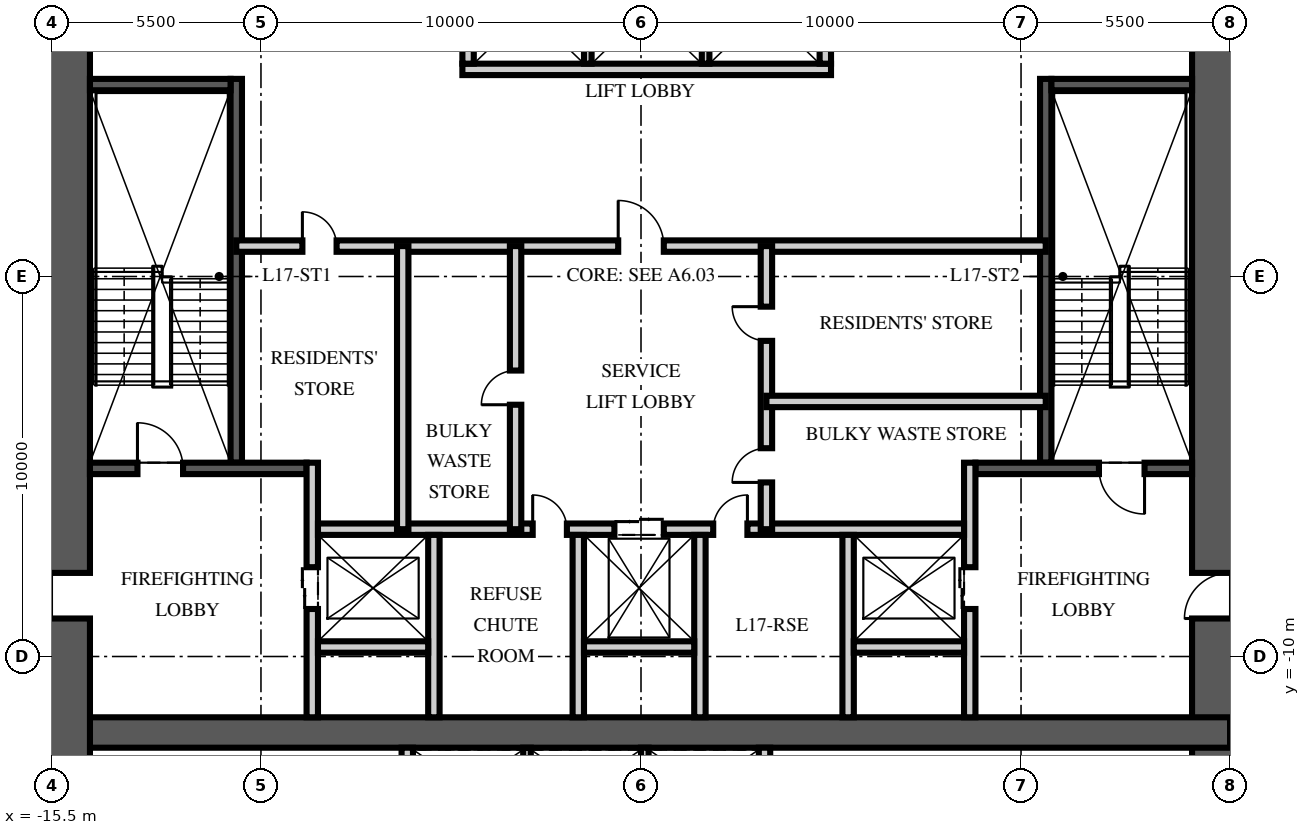
"""IFC4 building model, lengths in metres.
Left out: names, types, materials, properties, quantities, classifications, styles, units other than length and angle.
Written with IfcOpenShell. Run it as: python <this file> out.ifc"""

import sys

from ifc_helpers import new_model, si_unit, direction, frame, frame_2d, origin, place, context, subcontext, project, spatial, rectangle, extrude, element, fill, save


model = new_model("IFC4")
c1 = context("Model", 3, precision=1e-05, world=origin(), true_north=direction((0.0, 1.0)))
c2 = subcontext(c1, "Body", "Model", "MODEL_VIEW")
j1 = project(units=[si_unit("LENGTHUNIT", "METRE"), si_unit("PLANEANGLEUNIT", "RADIAN")], contexts=[c1])
p1 = place(None, origin())
s1 = spatial("IfcSite", under=j1, at=p1, CompositionType="ELEMENT")
p2 = place(p1, origin())
s2 = spatial("IfcBuilding", under=s1, at=p2, CompositionType="ELEMENT")
p3 = place(p2, frame((0.0, 0.0, 69.75)))
s3 = spatial("IfcBuildingStorey", under=s2, at=p3, CompositionType="ELEMENT", Elevation=69.75)
p4 = place(p3, frame((15.5, -15.5, -0.25), z_axis=(0.0, 0.0, 1.0), x_axis=(0.0, 1.0, 0.0)))
e1 = element("IfcWall", 1, at=p4, inside=s3, PredefinedType="SHEAR", context=c2, shape_type="SweptSolid", body=[
    extrude(rectangle(XDim=31.0, YDim=2.0, at=frame_2d((15.5, 0.0))), origin(), (0.0, 0.0, 1.0), 3.75),
])
p5 = place(p4, frame((6.5, 0.0, 0.25)))
e2 = element("IfcOpeningElement", 2, at=p5, cuts=e1, PredefinedType="OPENING", context=c2, shape_type="SweptSolid", body=[
    extrude(rectangle(XDim=1.2, YDim=2.1, at=frame_2d((0.6, 1.05))), frame((0.0, 1.01, 0.0), z_axis=(0.0, -1.0, 0.0), x_axis=(1.0, 0.0, 0.0)), (0.0, 0.0, 1.0), 2.02),
])
p6 = place(p4, frame((23.0, 0.0, 0.25)))
e3 = element("IfcOpeningElement", 3, at=p6, cuts=e1, PredefinedType="OPENING", context=c2, shape_type="SweptSolid", body=[
    extrude(rectangle(XDim=1.8, YDim=2.1, at=frame_2d((0.9, 1.05))), frame((0.0, 1.01, 0.0), z_axis=(0.0, -1.0, 0.0), x_axis=(1.0, 0.0, 0.0)), (0.0, 0.0, 1.0), 2.02),
])
p7 = place(p3, frame((-15.5, -12.0, -0.25), z_axis=(0.0, 0.0, 1.0), x_axis=(1.0, 0.0, 0.0)))
e4 = element("IfcWall", 4, at=p7, inside=s3, PredefinedType="SHEAR", context=c2, shape_type="SweptSolid", body=[
    extrude(rectangle(XDim=31.0, YDim=0.8, at=frame_2d((15.5, 0.0))), origin(), (0.0, 0.0, 1.0), 3.75),
])
p8 = place(p3, frame((-15.5, -15.5, -0.25), z_axis=(0.0, 0.0, 1.0), x_axis=(0.0, 1.0, 0.0)))
e5 = element("IfcWall", 5, at=p8, inside=s3, PredefinedType="SHEAR", context=c2, shape_type="SweptSolid", body=[
    extrude(rectangle(XDim=31.0, YDim=2.0, at=frame_2d((15.5, 0.0))), origin(), (0.0, 0.0, 1.0), 3.75),
])
p9 = place(p8, frame((6.5, 0.0, 0.25)))
e6 = element("IfcOpeningElement", 6, at=p9, cuts=e5, PredefinedType="OPENING", context=c2, shape_type="SweptSolid", body=[
    extrude(rectangle(XDim=1.2, YDim=2.1, at=frame_2d((0.6, 1.05))), frame((0.0, 1.01, 0.0), z_axis=(0.0, -1.0, 0.0), x_axis=(1.0, 0.0, 0.0)), (0.0, 0.0, 1.0), 2.02),
])
p10 = place(p8, frame((23.0, 0.0, 0.25)))
e7 = element("IfcOpeningElement", 7, at=p10, cuts=e5, PredefinedType="OPENING", context=c2, shape_type="SweptSolid", body=[
    extrude(rectangle(XDim=1.8, YDim=2.1, at=frame_2d((0.9, 1.05))), frame((0.0, 1.01, 0.0), z_axis=(0.0, -1.0, 0.0), x_axis=(1.0, 0.0, 0.0)), (0.0, 0.0, 1.0), 2.02),
])
p11 = place(p3, frame((-10.65, -4.9, 0.0), z_axis=(0.0, 0.0, 1.0), x_axis=(0.0, 1.0, 0.0)))
e8 = element("IfcWall", 8, at=p11, inside=s3, PredefinedType="SOLIDWALL", context=c2, shape_type="SweptSolid", body=[
    extrude(rectangle(XDim=10.1, YDim=0.3, at=frame_2d((5.05, 0.0))), origin(), (0.0, 0.0, 1.0), 3.5),
])
p12 = place(p3, frame((-14.5, -5.05, 0.0), z_axis=(0.0, 0.0, 1.0), x_axis=(1.0, 0.0, 0.0)))
e9 = element("IfcWall", 9, at=p12, inside=s3, PredefinedType="SOLIDWALL", context=c2, shape_type="SweptSolid", body=[
    extrude(rectangle(XDim=5.7, YDim=0.3, at=frame_2d((2.85, 0.0))), origin(), (0.0, 0.0, 1.0), 3.5),
])
p13 = place(p12, frame((1.25, 0.0, 0.0)))
e10 = element("IfcOpeningElement", 10, at=p13, cuts=e9, PredefinedType="OPENING", context=c2, shape_type="SweptSolid", body=[
    extrude(rectangle(XDim=1.2, YDim=2.1, at=frame_2d((0.6, 1.05))), frame((0.0, 0.16, 0.0), z_axis=(0.0, -1.0, 0.0), x_axis=(1.0, 0.0, 0.0)), (0.0, 0.0, 1.0), 0.32),
])
p14 = place(p3, frame((-14.5, 5.05, 0.0), z_axis=(0.0, 0.0, 1.0), x_axis=(1.0, 0.0, 0.0)))
e11 = element("IfcWall", 11, at=p14, inside=s3, PredefinedType="SOLIDWALL", context=c2, shape_type="SweptSolid", body=[
    extrude(rectangle(XDim=3.7, YDim=0.3, at=frame_2d((1.85, 0.0))), origin(), (0.0, 0.0, 1.0), 3.5),
])
p15 = place(p3, frame((-8.65, -11.6, 0.0), z_axis=(0.0, 0.0, 1.0), x_axis=(0.0, 1.0, 0.0)))
e12 = element("IfcWall", 12, at=p15, inside=s3, PredefinedType="PARTITIONING", context=c2, shape_type="SweptSolid", body=[
    extrude(rectangle(XDim=6.7, YDim=0.3, at=frame_2d((3.35, 0.0))), origin(), (0.0, 0.0, 1.0), 3.5),
])
p16 = place(p15, frame((2.85, 0.0, 0.0)))
e13 = element("IfcOpeningElement", 13, at=p16, cuts=e12, PredefinedType="OPENING", context=c2, shape_type="SweptSolid", body=[
    extrude(rectangle(XDim=1.1, YDim=2.1, at=frame_2d((0.55, 1.05))), frame((0.0, 0.16, 0.0), z_axis=(0.0, -1.0, 0.0), x_axis=(1.0, 0.0, 0.0)), (0.0, 0.0, 1.0), 0.32),
])
p17 = place(p3, frame((10.65, -4.9, 0.0), z_axis=(0.0, 0.0, 1.0), x_axis=(0.0, 1.0, 0.0)))
e14 = element("IfcWall", 14, at=p17, inside=s3, PredefinedType="SOLIDWALL", context=c2, shape_type="SweptSolid", body=[
    extrude(rectangle(XDim=10.1, YDim=0.3, at=frame_2d((5.05, 0.0))), origin(), (0.0, 0.0, 1.0), 3.5),
])
p18 = place(p3, frame((14.5, -5.05, 0.0), z_axis=(0.0, 0.0, 1.0), x_axis=(-1.0, 0.0, 0.0)))
e15 = element("IfcWall", 15, at=p18, inside=s3, PredefinedType="SOLIDWALL", context=c2, shape_type="SweptSolid", body=[
    extrude(rectangle(XDim=5.7, YDim=0.3, at=frame_2d((2.85, 0.0))), origin(), (0.0, 0.0, 1.0), 3.5),
])
p19 = place(p18, frame((1.25, 0.0, 0.0)))
e16 = element("IfcOpeningElement", 16, at=p19, cuts=e15, PredefinedType="OPENING", context=c2, shape_type="SweptSolid", body=[
    extrude(rectangle(XDim=1.2, YDim=2.1, at=frame_2d((0.6, 1.05))), frame((0.0, 0.16, 0.0), z_axis=(0.0, -1.0, 0.0), x_axis=(1.0, 0.0, 0.0)), (0.0, 0.0, 1.0), 0.32),
])
p20 = place(p3, frame((14.5, 5.05, 0.0), z_axis=(0.0, 0.0, 1.0), x_axis=(-1.0, 0.0, 0.0)))
e17 = element("IfcWall", 17, at=p20, inside=s3, PredefinedType="SOLIDWALL", context=c2, shape_type="SweptSolid", body=[
    extrude(rectangle(XDim=3.7, YDim=0.3, at=frame_2d((1.85, 0.0))), origin(), (0.0, 0.0, 1.0), 3.5),
])
p21 = place(p3, frame((8.65, -11.6, 0.0), z_axis=(0.0, 0.0, 1.0), x_axis=(0.0, 1.0, 0.0)))
e18 = element("IfcWall", 18, at=p21, inside=s3, PredefinedType="PARTITIONING", context=c2, shape_type="SweptSolid", body=[
    extrude(rectangle(XDim=6.7, YDim=0.3, at=frame_2d((3.35, 0.0))), origin(), (0.0, 0.0, 1.0), 3.5),
])
p22 = place(p21, frame((2.85, 0.0, 0.0)))
e19 = element("IfcOpeningElement", 19, at=p22, cuts=e18, PredefinedType="OPENING", context=c2, shape_type="SweptSolid", body=[
    extrude(rectangle(XDim=1.1, YDim=2.1, at=frame_2d((0.55, 1.05))), frame((0.0, 0.16, 0.0), z_axis=(0.0, -1.0, 0.0), x_axis=(1.0, 0.0, 0.0)), (0.0, 0.0, 1.0), 0.32),
])
p23 = place(p3, frame((-8.5, -6.65, 0.0), z_axis=(0.0, 0.0, 1.0), x_axis=(1.0, 0.0, 0.0)))
e20 = element("IfcWall", 20, at=p23, inside=s3, PredefinedType="PARTITIONING", context=c2, shape_type="SweptSolid", body=[
    extrude(rectangle(XDim=17.0, YDim=0.3, at=frame_2d((8.5, 0.0))), origin(), (0.0, 0.0, 1.0), 3.5),
])
p24 = place(p23, frame((7.8, 0.0, 0.0)))
e21 = element("IfcOpeningElement", 21, at=p24, cuts=e20, PredefinedType="OPENING", context=c2, shape_type="SweptSolid", body=[
    extrude(rectangle(XDim=1.3, YDim=2.4, at=frame_2d((0.65, 1.2))), frame((0.0, 0.16, 0.0), z_axis=(0.0, -1.0, 0.0), x_axis=(1.0, 0.0, 0.0)), (0.0, 0.0, 1.0), 0.32),
])
p25 = place(p23, frame((5.65, 0.0, 0.0)))
e22 = element("IfcOpeningElement", 22, at=p25, cuts=e20, PredefinedType="OPENING", context=c2, shape_type="SweptSolid", body=[
    extrude(rectangle(XDim=0.9, YDim=2.1, at=frame_2d((0.45, 1.05))), frame((0.0, 0.16, 0.0), z_axis=(0.0, -1.0, 0.0), x_axis=(1.0, 0.0, 0.0)), (0.0, 0.0, 1.0), 0.32),
])
p26 = place(p23, frame((10.4, 0.0, 0.0)))
e23 = element("IfcOpeningElement", 23, at=p26, cuts=e20, PredefinedType="OPENING", context=c2, shape_type="SweptSolid", body=[
    extrude(rectangle(XDim=0.9, YDim=2.1, at=frame_2d((0.45, 1.05))), frame((0.0, 0.16, 0.0), z_axis=(0.0, -1.0, 0.0), x_axis=(1.0, 0.0, 0.0)), (0.0, 0.0, 1.0), 0.32),
])
for number, where, z_axis, x_axis in (
    (24, (-5.45, -11.6, 0.0), (0.0, 0.0, 1.0), (0.0, 1.0, 0.0)),
    (25, (-1.65, -11.6, 0.0), (0.0, 0.0, 1.0), (0.0, 1.0, 0.0)),
    (26, (1.55, -11.6, 0.0), (0.0, 0.0, 1.0), (0.0, 1.0, 0.0)),
    (27, (5.45, -11.6, 0.0), (0.0, 0.0, 1.0), (0.0, 1.0, 0.0)),
):
    element("IfcWall", number, at=place(p3, frame(where, z_axis=z_axis, x_axis=x_axis)), inside=s3, PredefinedType="PARTITIONING", context=c2, shape_type="SweptSolid", body=[
        extrude(rectangle(XDim=4.8, YDim=0.3, at=frame_2d((2.4, 0.0))), origin(), (0.0, 0.0, 1.0), 3.5),
    ])
for number, where, z_axis, x_axis in (
    (28, (-8.5, -9.75, 0.0), (0.0, 0.0, 1.0), (1.0, 0.0, 0.0)),
    (29, (-1.5, -9.75, 0.0), (0.0, 0.0, 1.0), (1.0, 0.0, 0.0)),
    (30, (5.6, -9.75, 0.0), (0.0, 0.0, 1.0), (1.0, 0.0, 0.0)),
):
    element("IfcWall", number, at=place(p3, frame(where, z_axis=z_axis, x_axis=x_axis)), inside=s3, PredefinedType="PARTITIONING", context=c2, shape_type="SweptSolid", body=[
        extrude(rectangle(XDim=2.9, YDim=0.3, at=frame_2d((1.45, 0.0))), origin(), (0.0, 0.0, 1.0), 3.5),
    ])
p27 = place(p3, frame((-4.7, 5.45, 0.0), z_axis=(0.0, 0.0, 1.0), x_axis=(1.0, 0.0, 0.0)))
e31 = element("IfcWall", 31, at=p27, inside=s3, PredefinedType="PARTITIONING", context=c2, shape_type="SweptSolid", body=[
    extrude(rectangle(XDim=9.7, YDim=0.3, at=frame_2d((4.85, 0.0))), origin(), (0.0, 0.0, 1.0), 3.5),
])
for number, where, z_axis, x_axis in (
    (32, (-4.55, 5.6, 0.0), (0.0, 0.0, 1.0), (0.0, 1.0, 0.0)),
    (33, (4.85, 5.6, 0.0), (0.0, 0.0, 1.0), (0.0, 1.0, 0.0)),
):
    element("IfcWall", number, at=place(p3, frame(where, z_axis=z_axis, x_axis=x_axis)), inside=s3, PredefinedType="PARTITIONING", context=c2, shape_type="SweptSolid", body=[
        extrude(rectangle(XDim=2.8, YDim=0.3, at=frame_2d((1.4, 0.0))), origin(), (0.0, 0.0, 1.0), 3.5),
    ])
for number, where, z_axis, x_axis in (
    (34, (-1.4, 5.6, 0.0), (0.0, 0.0, 1.0), (0.0, 1.0, 0.0)),
    (35, (1.7, 5.6, 0.0), (0.0, 0.0, 1.0), (0.0, 1.0, 0.0)),
):
    element("IfcWall", number, at=place(p3, frame(where, z_axis=z_axis, x_axis=x_axis)), inside=s3, PredefinedType="PARTITIONING", context=c2, shape_type="SweptSolid", body=[
        extrude(rectangle(XDim=2.8, YDim=0.2, at=frame_2d((1.4, 0.0))), origin(), (0.0, 0.0, 1.0), 3.5),
    ])
for number, where, z_axis, x_axis in (
    (36, (-6.15, -14.5, 0.0), (0.0, 0.0, 1.0), (0.0, 1.0, 0.0)),
    (37, (3.25, -14.5, 0.0), (0.0, 0.0, 1.0), (0.0, 1.0, 0.0)),
):
    element("IfcWall", number, at=place(p3, frame(where, z_axis=z_axis, x_axis=x_axis)), inside=s3, PredefinedType="PARTITIONING", context=c2, shape_type="SweptSolid", body=[
        extrude(rectangle(XDim=2.1, YDim=0.3, at=frame_2d((1.05, 0.0))), origin(), (0.0, 0.0, 1.0), 3.5),
    ])
for number, where, z_axis, x_axis in (
    (38, (-3.0, -14.5, 0.0), (0.0, 0.0, 1.0), (0.0, 1.0, 0.0)),
    (39, (0.1, -14.5, 0.0), (0.0, 0.0, 1.0), (0.0, 1.0, 0.0)),
):
    element("IfcWall", number, at=place(p3, frame(where, z_axis=z_axis, x_axis=x_axis)), inside=s3, PredefinedType="PARTITIONING", context=c2, shape_type="SweptSolid", body=[
        extrude(rectangle(XDim=2.1, YDim=0.2, at=frame_2d((1.05, 0.0))), origin(), (0.0, 0.0, 1.0), 3.5),
    ])
p28 = place(p3, frame((-10.65, 0.8, 0.0), z_axis=(0.0, 0.0, 1.0), x_axis=(1.0, 0.0, 0.0)))
e40 = element("IfcWall", 40, at=p28, inside=s3, PredefinedType="PARTITIONING", context=c2, shape_type="SweptSolid", body=[
    extrude(rectangle(XDim=21.3, YDim=0.3, at=frame_2d((10.65, 0.0))), origin(), (0.0, 0.0, 1.0), 3.5),
])
p29 = place(p28, frame((10.05, 0.0, 0.0)))
e41 = element("IfcOpeningElement", 41, at=p29, cuts=e40, PredefinedType="OPENING", context=c2, shape_type="SweptSolid", body=[
    extrude(rectangle(XDim=1.2, YDim=2.1, at=frame_2d((0.6, 1.05))), frame((0.0, 0.16, 0.0), z_axis=(0.0, -1.0, 0.0), x_axis=(1.0, 0.0, 0.0)), (0.0, 0.0, 1.0), 0.32),
])
p30 = place(p28, frame((1.74, 0.0, 0.0)))
e42 = element("IfcOpeningElement", 42, at=p30, cuts=e40, PredefinedType="OPENING", context=c2, shape_type="SweptSolid", body=[
    extrude(rectangle(XDim=0.9, YDim=2.1, at=frame_2d((0.45, 1.05))), frame((0.0, 0.16, 0.0), z_axis=(0.0, -1.0, 0.0), x_axis=(1.0, 0.0, 0.0)), (0.0, 0.0, 1.0), 0.32),
])
p31 = place(p3, frame((-3.3, -6.65, 0.0), z_axis=(0.0, 0.0, 1.0), x_axis=(0.0, 1.0, 0.0)))
e43 = element("IfcWall", 43, at=p31, inside=s3, PredefinedType="PARTITIONING", context=c2, shape_type="SweptSolid", body=[
    extrude(rectangle(XDim=7.45, YDim=0.3, at=frame_2d((3.725, 0.0))), origin(), (0.0, 0.0, 1.0), 3.5),
])
p32 = place(p31, frame((3.275, 0.0, 0.0)))
e44 = element("IfcOpeningElement", 44, at=p32, cuts=e43, PredefinedType="OPENING", context=c2, shape_type="SweptSolid", body=[
    extrude(rectangle(XDim=0.9, YDim=2.1, at=frame_2d((0.45, 1.05))), frame((0.0, 0.16, 0.0), z_axis=(0.0, -1.0, 0.0), x_axis=(1.0, 0.0, 0.0)), (0.0, 0.0, 1.0), 0.32),
])
p33 = place(p3, frame((3.3, -6.65, 0.0), z_axis=(0.0, 0.0, 1.0), x_axis=(0.0, 1.0, 0.0)))
e45 = element("IfcWall", 45, at=p33, inside=s3, PredefinedType="PARTITIONING", context=c2, shape_type="SweptSolid", body=[
    extrude(rectangle(XDim=7.45, YDim=0.3, at=frame_2d((3.725, 0.0))), origin(), (0.0, 0.0, 1.0), 3.5),
])
p34 = place(p33, frame((1.231, 0.0, 0.0)))
e46 = element("IfcOpeningElement", 46, at=p34, cuts=e45, PredefinedType="OPENING", context=c2, shape_type="SweptSolid", body=[
    extrude(rectangle(XDim=0.9, YDim=2.1, at=frame_2d((0.45, 1.05))), frame((0.0, 0.16, 0.0), z_axis=(0.0, -1.0, 0.0), x_axis=(1.0, 0.0, 0.0)), (0.0, 0.0, 1.0), 0.32),
])
p35 = place(p33, frame((4.956, 0.0, 0.0)))
e47 = element("IfcOpeningElement", 47, at=p35, cuts=e45, PredefinedType="OPENING", context=c2, shape_type="SweptSolid", body=[
    extrude(rectangle(XDim=0.9, YDim=2.1, at=frame_2d((0.45, 1.05))), frame((0.0, 0.16, 0.0), z_axis=(0.0, -1.0, 0.0), x_axis=(1.0, 0.0, 0.0)), (0.0, 0.0, 1.0), 0.32),
])
p36 = place(p3, frame((-6.27, -6.65, 0.0), z_axis=(0.0, 0.0, 1.0), x_axis=(0.0, 1.0, 0.0)))
e48 = element("IfcWall", 48, at=p36, inside=s3, PredefinedType="PARTITIONING", context=c2, shape_type="SweptSolid", body=[
    extrude(rectangle(XDim=7.45, YDim=0.3, at=frame_2d((3.725, 0.0))), origin(), (0.0, 0.0, 1.0), 3.5),
])
p37 = place(p3, frame((10.65, -3.288, 0.0), z_axis=(0.0, 0.0, 1.0), x_axis=(-1.0, 0.0, 0.0)))
e49 = element("IfcWall", 49, at=p37, inside=s3, PredefinedType="PARTITIONING", context=c2, shape_type="SweptSolid", body=[
    extrude(rectangle(XDim=7.35, YDim=0.3, at=frame_2d((3.675, 0.0))), origin(), (0.0, 0.0, 1.0), 3.5),
])
p38 = place(p13, origin())
e50 = element("IfcDoor", 50, at=p38, inside=s3, OperationType="SINGLE_SWING_LEFT", PredefinedType="DOOR", context=c2, shape_type="SweptSolid", body=[
    extrude(rectangle(XDim=1.2, YDim=2.1, at=frame_2d((0.6, 1.05))), frame((0.0, 0.025, 0.0), z_axis=(0.0, -1.0, 0.0), x_axis=(1.0, 0.0, 0.0)), (0.0, 0.0, 1.0), 0.05),
])
fill(e10, e50)
p39 = place(p9, origin())
e51 = element("IfcDoor", 51, at=p39, inside=s3, OperationType="SINGLE_SWING_LEFT", PredefinedType="DOOR", context=c2, shape_type="SweptSolid", body=[
    extrude(rectangle(XDim=1.2, YDim=2.1, at=frame_2d((0.6, 1.05))), frame((0.0, 0.025, 0.0), z_axis=(0.0, -1.0, 0.0), x_axis=(1.0, 0.0, 0.0)), (0.0, 0.0, 1.0), 0.05),
])
fill(e6, e51)
p40 = place(p19, origin())
e52 = element("IfcDoor", 52, at=p40, inside=s3, OperationType="SINGLE_SWING_LEFT", PredefinedType="DOOR", context=c2, shape_type="SweptSolid", body=[
    extrude(rectangle(XDim=1.2, YDim=2.1, at=frame_2d((0.6, 1.05))), frame((0.0, 0.025, 0.0), z_axis=(0.0, -1.0, 0.0), x_axis=(1.0, 0.0, 0.0)), (0.0, 0.0, 1.0), 0.05),
])
fill(e16, e52)
p41 = place(p5, origin())
e53 = element("IfcDoor", 53, at=p41, inside=s3, OperationType="SINGLE_SWING_LEFT", PredefinedType="DOOR", context=c2, shape_type="SweptSolid", body=[
    extrude(rectangle(XDim=1.2, YDim=2.1, at=frame_2d((0.6, 1.05))), frame((0.0, 0.025, 0.0), z_axis=(0.0, -1.0, 0.0), x_axis=(1.0, 0.0, 0.0)), (0.0, 0.0, 1.0), 0.05),
])
fill(e2, e53)
p42 = place(p16, origin())
e54 = element("IfcDoor", 54, at=p42, inside=s3, OperationType="DOUBLE_DOOR_SLIDING", PredefinedType="DOOR", context=c2, shape_type="SweptSolid", body=[
    extrude(rectangle(XDim=1.1, YDim=2.1, at=frame_2d((0.55, 1.05))), frame((0.0, 0.025, 0.0), z_axis=(0.0, -1.0, 0.0), x_axis=(1.0, 0.0, 0.0)), (0.0, 0.0, 1.0), 0.05),
])
fill(e13, e54)
p43 = place(p22, origin())
e55 = element("IfcDoor", 55, at=p43, inside=s3, OperationType="DOUBLE_DOOR_SLIDING", PredefinedType="DOOR", context=c2, shape_type="SweptSolid", body=[
    extrude(rectangle(XDim=1.1, YDim=2.1, at=frame_2d((0.55, 1.05))), frame((0.0, 0.025, 0.0), z_axis=(0.0, -1.0, 0.0), x_axis=(1.0, 0.0, 0.0)), (0.0, 0.0, 1.0), 0.05),
])
fill(e19, e55)
p44 = place(p24, origin())
e56 = element("IfcDoor", 56, at=p44, inside=s3, OperationType="DOUBLE_DOOR_SLIDING", PredefinedType="DOOR", context=c2, shape_type="SweptSolid", body=[
    extrude(rectangle(XDim=1.3, YDim=2.4, at=frame_2d((0.65, 1.2))), frame((0.0, 0.025, 0.0), z_axis=(0.0, -1.0, 0.0), x_axis=(1.0, 0.0, 0.0)), (0.0, 0.0, 1.0), 0.05),
])
fill(e21, e56)
p45 = place(p29, origin())
e57 = element("IfcDoor", 57, at=p45, inside=s3, OperationType="SINGLE_SWING_LEFT", PredefinedType="DOOR", context=c2, shape_type="SweptSolid", body=[
    extrude(rectangle(XDim=1.2, YDim=2.1, at=frame_2d((0.6, 1.05))), frame((0.0, 0.025, 0.0), z_axis=(0.0, -1.0, 0.0), x_axis=(1.0, 0.0, 0.0)), (0.0, 0.0, 1.0), 0.05),
])
fill(e41, e57)
p46 = place(p25, origin())
e58 = element("IfcDoor", 58, at=p46, inside=s3, OperationType="SINGLE_SWING_LEFT", PredefinedType="DOOR", context=c2, shape_type="SweptSolid", body=[
    extrude(rectangle(XDim=0.9, YDim=2.1, at=frame_2d((0.45, 1.05))), frame((0.0, 0.025, 0.0), z_axis=(0.0, -1.0, 0.0), x_axis=(1.0, 0.0, 0.0)), (0.0, 0.0, 1.0), 0.05),
])
fill(e22, e58)
p47 = place(p26, origin())
e59 = element("IfcDoor", 59, at=p47, inside=s3, OperationType="SINGLE_SWING_RIGHT", PredefinedType="DOOR", context=c2, shape_type="SweptSolid", body=[
    extrude(rectangle(XDim=0.9, YDim=2.1, at=frame_2d((0.45, 1.05))), frame((0.0, 0.025, 0.0), z_axis=(0.0, -1.0, 0.0), x_axis=(1.0, 0.0, 0.0)), (0.0, 0.0, 1.0), 0.05),
])
fill(e23, e59)
p48 = place(p32, origin())
e60 = element("IfcDoor", 60, at=p48, inside=s3, OperationType="SINGLE_SWING_LEFT", PredefinedType="DOOR", context=c2, shape_type="SweptSolid", body=[
    extrude(rectangle(XDim=0.9, YDim=2.1, at=frame_2d((0.45, 1.05))), frame((0.0, 0.025, 0.0), z_axis=(0.0, -1.0, 0.0), x_axis=(1.0, 0.0, 0.0)), (0.0, 0.0, 1.0), 0.05),
])
fill(e44, e60)
p49 = place(p30, origin())
e61 = element("IfcDoor", 61, at=p49, inside=s3, OperationType="SINGLE_SWING_LEFT", PredefinedType="DOOR", context=c2, shape_type="SweptSolid", body=[
    extrude(rectangle(XDim=0.9, YDim=2.1, at=frame_2d((0.45, 1.05))), frame((0.0, 0.025, 0.0), z_axis=(0.0, -1.0, 0.0), x_axis=(1.0, 0.0, 0.0)), (0.0, 0.0, 1.0), 0.05),
])
fill(e42, e61)
p50 = place(p34, origin())
e62 = element("IfcDoor", 62, at=p50, inside=s3, OperationType="SINGLE_SWING_LEFT", PredefinedType="DOOR", context=c2, shape_type="SweptSolid", body=[
    extrude(rectangle(XDim=0.9, YDim=2.1, at=frame_2d((0.45, 1.05))), frame((0.0, 0.025, 0.0), z_axis=(0.0, -1.0, 0.0), x_axis=(1.0, 0.0, 0.0)), (0.0, 0.0, 1.0), 0.05),
])
fill(e46, e62)
p51 = place(p35, origin())
e63 = element("IfcDoor", 63, at=p51, inside=s3, OperationType="SINGLE_SWING_RIGHT", PredefinedType="DOOR", context=c2, shape_type="SweptSolid", body=[
    extrude(rectangle(XDim=0.9, YDim=2.1, at=frame_2d((0.45, 1.05))), frame((0.0, 0.025, 0.0), z_axis=(0.0, -1.0, 0.0), x_axis=(1.0, 0.0, 0.0)), (0.0, 0.0, 1.0), 0.05),
])
fill(e47, e63)
save(model, sys.argv[1])
